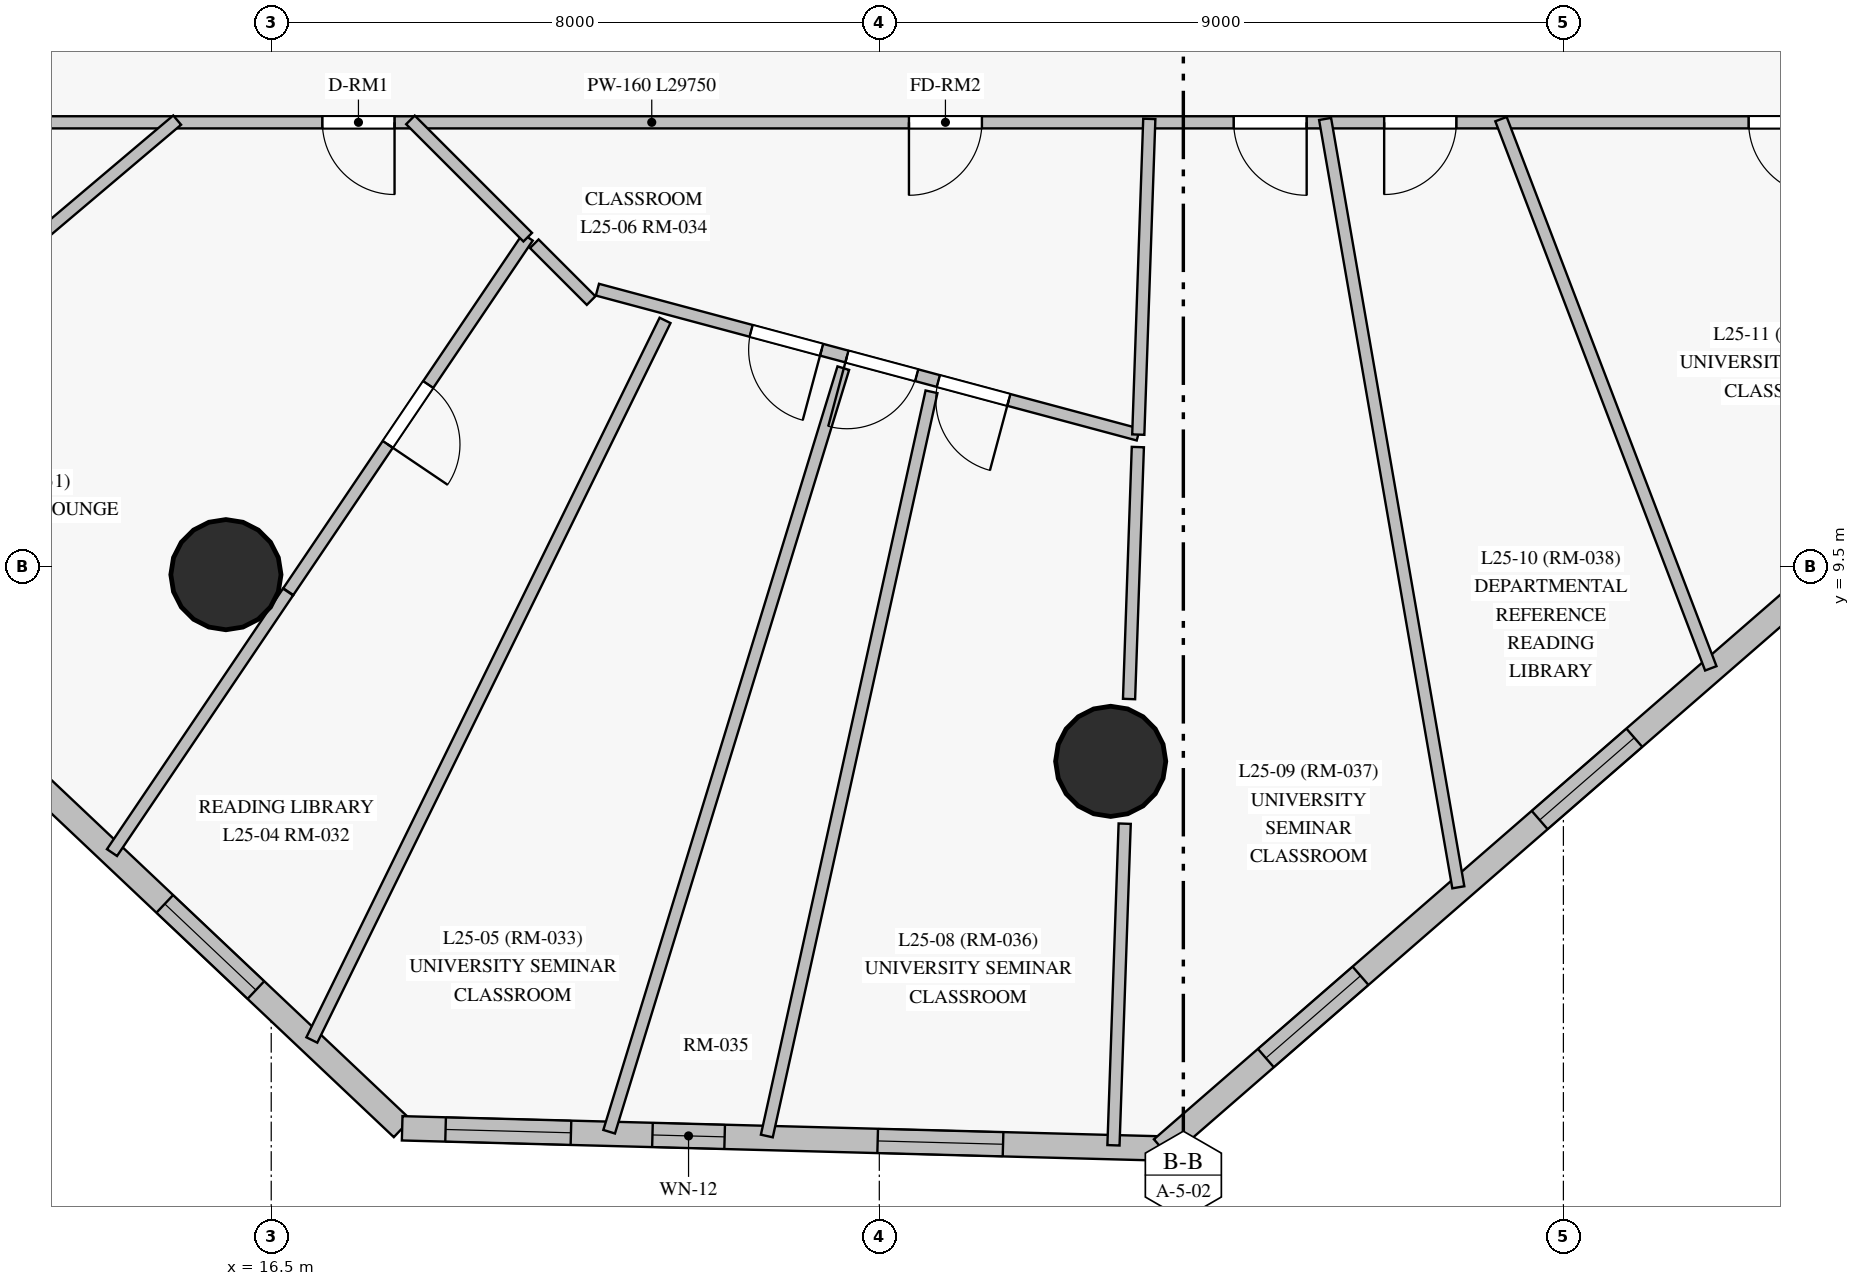
"""IFC4 building model, lengths in metres.
Left out: names, types, materials, properties, quantities, classifications, styles, units other than length and angle.
Written with IfcOpenShell. Run it as: python <this file> out.ifc"""

import sys

from ifc_helpers import new_model, si_unit, direction, frame, frame_2d, origin, origin_with_axes, origin_2d, place, context, subcontext, project, spatial, rectangle, circle, extrude, source, transform, mapped, element, fill, save


model = new_model("IFC4")
c1 = context("Model", 3, precision=1e-05, world=origin(), true_north=direction((0.0, 1.0)))
c2 = subcontext(c1, "Body", "Model", "MODEL_VIEW")
j1 = project(units=[si_unit("LENGTHUNIT", "METRE"), si_unit("PLANEANGLEUNIT", "RADIAN")], contexts=[c1])
p1 = place(None, origin())
s1 = spatial("IfcSite", under=j1, at=p1, CompositionType="ELEMENT")
p2 = place(p1, origin())
s2 = spatial("IfcBuilding", under=s1, at=p2, CompositionType="ELEMENT")
p3 = place(p2, frame((0.0, 0.0, 96.2)))
s3 = spatial("IfcBuildingStorey", under=s2, at=p3, CompositionType="ELEMENT", Elevation=96.2)
m1 = source(origin_with_axes(), c2, "Body", "SweptSolid", [
    extrude(circle(Radius=0.725, at=origin_2d()), origin(), (0.0, 0.0, 1.0), 3.05),
])
for number, where, z_axis, x_axis in (
    (1, (15.904, 9.399, 0.0), (0.0, 0.0, 1.0), (1.0, 0.0, 0.0)),
    (2, (27.544, 6.943, 0.0), (0.0, 0.0, 1.0), (1.0, 0.0, 0.0)),
):
    element("IfcColumn", number, at=place(p3, frame(where, z_axis=z_axis, x_axis=x_axis)), inside=s3, PredefinedType="COLUMN", context=c2, shape_type="MappedRepresentation", body=[
        mapped(m1, transform((0.0, 0.0, 0.0), scale=1.0)),
    ])
p4 = place(p3, frame((9.16, 10.682, 0.0), z_axis=(0.0, 0.0, 1.0), x_axis=(0.726725897384, -0.686927558096, 0.0)))
e3 = element("IfcWall", 3, at=p4, inside=s3, PredefinedType="SOLIDWALL", context=c2, shape_type="SweptSolid", body=[
    extrude(rectangle(XDim=12.471, YDim=0.32, at=frame_2d((6.236, 0.0))), origin(), (0.0, 0.0, 1.0), 2.825),
])
p5 = place(p4, frame((2.956, 0.0, 0.85)))
e4 = element("IfcOpeningElement", 4, at=p5, cuts=e3, PredefinedType="OPENING", context=c2, shape_type="SweptSolid", body=[
    extrude(rectangle(XDim=1.65, YDim=1.65, at=frame_2d((0.825, 0.825))), frame((0.0, 0.17, 0.0), z_axis=(0.0, -1.0, 0.0), x_axis=(1.0, 0.0, 0.0)), (0.0, 0.0, 1.0), 0.34),
])
p6 = place(p4, frame((8.173, 0.0, 0.85)))
e5 = element("IfcOpeningElement", 5, at=p6, cuts=e3, PredefinedType="OPENING", context=c2, shape_type="SweptSolid", body=[
    extrude(rectangle(XDim=1.65, YDim=1.65, at=frame_2d((0.825, 0.825))), frame((0.0, 0.17, 0.0), z_axis=(0.0, -1.0, 0.0), x_axis=(1.0, 0.0, 0.0)), (0.0, 0.0, 1.0), 0.34),
])
p7 = place(p3, frame((18.223, 2.115, 0.0), z_axis=(0.0, 0.0, 1.0), x_axis=(0.999648337499, -0.026517943636, 0.0)))
e6 = element("IfcWall", 6, at=p7, inside=s3, PredefinedType="SOLIDWALL", context=c2, shape_type="SweptSolid", body=[
    extrude(rectangle(XDim=9.998, YDim=0.32, at=frame_2d((4.999, 0.0))), origin(), (0.0, 0.0, 1.0), 2.825),
])
p8 = place(p7, frame((0.571, 0.0, 0.85)))
e7 = element("IfcOpeningElement", 7, at=p8, cuts=e6, PredefinedType="OPENING", context=c2, shape_type="SweptSolid", body=[
    extrude(rectangle(XDim=1.65, YDim=1.65, at=frame_2d((0.825, 0.825))), frame((0.0, 0.17, 0.0), z_axis=(0.0, -1.0, 0.0), x_axis=(1.0, 0.0, 0.0)), (0.0, 0.0, 1.0), 0.34),
])
p9 = place(p7, frame((3.294, 0.0, 0.85)))
e8 = element("IfcOpeningElement", 8, at=p9, cuts=e6, PredefinedType="OPENING", context=c2, shape_type="SweptSolid", body=[
    extrude(rectangle(XDim=0.95, YDim=1.5, at=frame_2d((0.475, 0.75))), frame((0.0, 0.17, 0.0), z_axis=(0.0, -1.0, 0.0), x_axis=(1.0, 0.0, 0.0)), (0.0, 0.0, 1.0), 0.34),
])
p10 = place(p7, frame((6.258, 0.0, 0.85)))
e9 = element("IfcOpeningElement", 9, at=p10, cuts=e6, PredefinedType="OPENING", context=c2, shape_type="SweptSolid", body=[
    extrude(rectangle(XDim=1.65, YDim=1.65, at=frame_2d((0.825, 0.825))), frame((0.0, 0.17, 0.0), z_axis=(0.0, -1.0, 0.0), x_axis=(1.0, 0.0, 0.0)), (0.0, 0.0, 1.0), 0.34),
])
p11 = place(p3, frame((28.218, 1.85, 0.0), z_axis=(0.0, 0.0, 1.0), x_axis=(0.754675133032, 0.65609865385, 0.0)))
e10 = element("IfcWall", 10, at=p11, inside=s3, PredefinedType="SOLIDWALL", context=c2, shape_type="SweptSolid", body=[
    extrude(rectangle(XDim=14.949, YDim=0.32, at=frame_2d((7.475, 0.0))), origin(), (0.0, 0.0, 1.0), 2.825),
])
p12 = place(p11, frame((1.813, 0.0, 0.85)))
e11 = element("IfcOpeningElement", 11, at=p12, cuts=e10, PredefinedType="OPENING", context=c2, shape_type="SweptSolid", body=[
    extrude(rectangle(XDim=1.65, YDim=1.65, at=frame_2d((0.825, 0.825))), frame((0.0, 0.17, 0.0), z_axis=(0.0, -1.0, 0.0), x_axis=(1.0, 0.0, 0.0)), (0.0, 0.0, 1.0), 0.34),
])
p13 = place(p11, frame((6.586, 0.0, 0.85)))
e12 = element("IfcOpeningElement", 12, at=p13, cuts=e10, PredefinedType="OPENING", context=c2, shape_type="SweptSolid", body=[
    extrude(rectangle(XDim=1.65, YDim=1.65, at=frame_2d((0.825, 0.825))), frame((0.0, 0.17, 0.0), z_axis=(0.0, -1.0, 0.0), x_axis=(1.0, 0.0, 0.0)), (0.0, 0.0, 1.0), 0.34),
])
p14 = place(p11, frame((11.423, 0.0, 0.85)))
e13 = element("IfcOpeningElement", 13, at=p14, cuts=e10, PredefinedType="OPENING", context=c2, shape_type="SweptSolid", body=[
    extrude(rectangle(XDim=1.65, YDim=1.65, at=frame_2d((0.825, 0.825))), frame((0.0, 0.17, 0.0), z_axis=(0.0, -1.0, 0.0), x_axis=(1.0, 0.0, 0.0)), (0.0, 0.0, 1.0), 0.34),
])
p15 = place(p3, frame((40.25, 15.35, 0.0), z_axis=(0.0, 0.0, 1.0), x_axis=(-1.0, 0.0, 0.0)))
e14 = element("IfcWall", 14, at=p15, inside=s3, PredefinedType="PARTITIONING", context=c2, shape_type="SweptSolid", body=[
    extrude(rectangle(XDim=29.75, YDim=0.16, at=frame_2d((14.875, 0.0))), origin(), (0.0, 0.0, 1.0), 2.225),
])
p16 = place(p15, frame((22.127, 0.0, 0.0)))
e15 = element("IfcOpeningElement", 15, at=p16, cuts=e14, PredefinedType="OPENING", context=c2, shape_type="SweptSolid", body=[
    extrude(rectangle(XDim=0.95, YDim=2.15, at=frame_2d((0.475, 1.075))), frame((0.0, 0.09, 0.0), z_axis=(0.0, -1.0, 0.0), x_axis=(1.0, 0.0, 0.0)), (0.0, 0.0, 1.0), 0.18),
])
p17 = place(p15, frame((14.4, 0.0, 0.0)))
e16 = element("IfcOpeningElement", 16, at=p17, cuts=e14, PredefinedType="OPENING", context=c2, shape_type="SweptSolid", body=[
    extrude(rectangle(XDim=0.96, YDim=2.15, at=frame_2d((0.48, 1.075))), frame((0.0, 0.09, 0.0), z_axis=(0.0, -1.0, 0.0), x_axis=(1.0, 0.0, 0.0)), (0.0, 0.0, 1.0), 0.18),
])
p18 = place(p15, frame((10.127, 0.0, 0.0)))
e17 = element("IfcOpeningElement", 17, at=p18, cuts=e14, PredefinedType="OPENING", context=c2, shape_type="SweptSolid", body=[
    extrude(rectangle(XDim=0.96, YDim=2.15, at=frame_2d((0.48, 1.075))), frame((0.0, 0.09, 0.0), z_axis=(0.0, -1.0, 0.0), x_axis=(1.0, 0.0, 0.0)), (0.0, 0.0, 1.0), 0.18),
])
p19 = place(p15, frame((8.158, 0.0, 0.0)))
e18 = element("IfcOpeningElement", 18, at=p19, cuts=e14, PredefinedType="OPENING", context=c2, shape_type="SweptSolid", body=[
    extrude(rectangle(XDim=0.95, YDim=2.15, at=frame_2d((0.475, 1.075))), frame((0.0, 0.09, 0.0), z_axis=(0.0, -1.0, 0.0), x_axis=(1.0, 0.0, 0.0)), (0.0, 0.0, 1.0), 0.18),
])
p20 = place(p15, frame((3.353, 0.0, 0.0)))
e19 = element("IfcOpeningElement", 19, at=p20, cuts=e14, PredefinedType="OPENING", context=c2, shape_type="SweptSolid", body=[
    extrude(rectangle(XDim=0.96, YDim=2.15, at=frame_2d((0.48, 1.075))), frame((0.0, 0.09, 0.0), z_axis=(0.0, -1.0, 0.0), x_axis=(1.0, 0.0, 0.0)), (0.0, 0.0, 1.0), 0.18),
])
p21 = place(p3, frame((21.681, 12.744, 0.0), z_axis=(0.0, 0.0, 1.0), x_axis=(-0.440627063777, -0.897690253187, 0.0)))
e20 = element("IfcWall", 20, at=p21, inside=s3, PredefinedType="PARTITIONING", context=c2, shape_type="SweptSolid", body=[
    extrude(rectangle(XDim=10.546, YDim=0.16, at=frame_2d((5.273, 0.0))), origin(), (0.0, 0.0, 1.0), 2.825),
])
p22 = place(p3, frame((24.026, 12.116, 0.0), z_axis=(0.0, 0.0, 1.0), x_axis=(-0.293181178855, -0.956056900171, 0.0)))
e21 = element("IfcWall", 21, at=p22, inside=s3, PredefinedType="PARTITIONING", context=c2, shape_type="SweptSolid", body=[
    extrude(rectangle(XDim=10.507, YDim=0.16, at=frame_2d((5.254, 0.0))), origin(), (0.0, 0.0, 1.0), 2.825),
])
p23 = place(p3, frame((30.365, 15.394, 0.0), z_axis=(0.0, 0.0, 1.0), x_axis=(0.170863116861, -0.985294775839, 0.0)))
e22 = element("IfcWall", 22, at=p23, inside=s3, PredefinedType="PARTITIONING", context=c2, shape_type="SweptSolid", body=[
    extrude(rectangle(XDim=10.259, YDim=0.16, at=frame_2d((5.13, 0.0))), origin(), (0.0, 0.0, 1.0), 2.825),
])
p24 = place(p3, frame((25.187, 11.805, 0.0), z_axis=(0.0, 0.0, 1.0), x_axis=(-0.216053884033, -0.976381441443, 0.0)))
e23 = element("IfcWall", 23, at=p24, inside=s3, PredefinedType="PARTITIONING", context=c2, shape_type="SweptSolid", body=[
    extrude(rectangle(XDim=10.028, YDim=0.16, at=frame_2d((5.014, 0.0))), origin(), (0.0, 0.0, 1.0), 2.825),
])
p25 = place(p3, frame((32.679, 15.392, 0.0), z_axis=(0.0, 0.0, 1.0), x_axis=(0.356831287963, -0.934168845515, 0.0)))
e24 = element("IfcWall", 24, at=p25, inside=s3, PredefinedType="PARTITIONING", context=c2, shape_type="SweptSolid", body=[
    extrude(rectangle(XDim=7.735, YDim=0.16, at=frame_2d((3.867, 0.0))), origin(), (0.0, 0.0, 1.0), 2.825),
])
p26 = place(p3, frame((15.262, 15.379, 0.0), z_axis=(0.0, 0.0, 1.0), x_axis=(-0.763411780434, -0.645912109729, 0.0)))
e25 = element("IfcWall", 25, at=p26, inside=s3, PredefinedType="PARTITIONING", context=c2, shape_type="SweptSolid", body=[
    extrude(rectangle(XDim=7.628, YDim=0.16, at=frame_2d((3.814, 0.0))), origin(), (0.0, 0.0, 1.0), 2.225),
])
p27 = place(p3, frame((27.907, 11.242, 0.0), z_axis=(0.0, 0.0, 1.0), x_axis=(-0.965920682586, 0.258838240899, 0.0)))
e26 = element("IfcWall", 26, at=p27, inside=s3, PredefinedType="PARTITIONING", context=c2, shape_type="SweptSolid", body=[
    extrude(rectangle(XDim=7.366, YDim=0.16, at=frame_2d((3.683, 0.0))), origin(), (0.0, 0.0, 1.0), 2.325),
])
p28 = place(p27, frame((4.313, 0.0, 0.0)))
e27 = element("IfcOpeningElement", 27, at=p28, cuts=e26, PredefinedType="OPENING", context=c2, shape_type="SweptSolid", body=[
    extrude(rectangle(XDim=0.96, YDim=2.15, at=frame_2d((0.48, 1.075))), frame((0.0, 0.09, 0.0), z_axis=(0.0, -1.0, 0.0), x_axis=(1.0, 0.0, 0.0)), (0.0, 0.0, 1.0), 0.18),
])
p29 = place(p27, frame((3.018, 0.0, 0.0)))
e28 = element("IfcOpeningElement", 28, at=p29, cuts=e26, PredefinedType="OPENING", context=c2, shape_type="SweptSolid", body=[
    extrude(rectangle(XDim=0.95, YDim=2.15, at=frame_2d((0.475, 1.075))), frame((0.0, 0.09, 0.0), z_axis=(0.0, -1.0, 0.0), x_axis=(1.0, 0.0, 0.0)), (0.0, 0.0, 1.0), 0.18),
])
p30 = place(p27, frame((1.763, 0.0, 0.0)))
e29 = element("IfcOpeningElement", 29, at=p30, cuts=e26, PredefinedType="OPENING", context=c2, shape_type="SweptSolid", body=[
    extrude(rectangle(XDim=0.96, YDim=2.15, at=frame_2d((0.48, 1.075))), frame((0.0, 0.09, 0.0), z_axis=(0.0, -1.0, 0.0), x_axis=(1.0, 0.0, 0.0)), (0.0, 0.0, 1.0), 0.18),
])
p31 = place(p3, frame((19.875, 13.839, 0.0), z_axis=(0.0, 0.0, 1.0), x_axis=(-0.559775304188, -0.82864444053, 0.0)))
e30 = element("IfcWall", 30, at=p31, inside=s3, PredefinedType="PARTITIONING", context=c2, shape_type="SweptSolid", body=[
    extrude(rectangle(XDim=5.628, YDim=0.16, at=frame_2d((2.814, 0.0))), origin(), (0.0, 0.0, 1.0), 2.825),
])
p32 = place(p31, frame((2.339, 0.0, 0.0)))
e31 = element("IfcOpeningElement", 31, at=p32, cuts=e30, PredefinedType="OPENING", context=c2, shape_type="SweptSolid", body=[
    extrude(rectangle(XDim=0.95, YDim=2.15, at=frame_2d((0.475, 1.075))), frame((0.0, 0.09, 0.0), z_axis=(0.0, -1.0, 0.0), x_axis=(1.0, 0.0, 0.0)), (0.0, 0.0, 1.0), 0.18),
])
p33 = place(p3, frame((27.728, 6.123, 0.0), z_axis=(0.0, 0.0, 1.0), x_axis=(-0.03488729491, -0.99939125304, 0.0)))
e32 = element("IfcWall", 32, at=p33, inside=s3, PredefinedType="PARTITIONING", context=c2, shape_type="SweptSolid", body=[
    extrude(rectangle(XDim=4.234, YDim=0.16, at=frame_2d((2.117, 0.0))), origin(), (0.0, 0.0, 1.0), 2.825),
])
p34 = place(p3, frame((28.052, 15.395, 0.0), z_axis=(0.0, 0.0, 1.0), x_axis=(-0.034895264462, -0.999390974803, 0.0)))
e33 = element("IfcWall", 33, at=p34, inside=s3, PredefinedType="PARTITIONING", context=c2, shape_type="SweptSolid", body=[
    extrude(rectangle(XDim=4.156, YDim=0.16, at=frame_2d((2.078, 0.0))), origin(), (0.0, 0.0, 1.0), 2.825),
])
p35 = place(p3, frame((16.721, 9.171, 0.0), z_axis=(0.0, 0.0, 1.0), x_axis=(-0.559768724879, -0.828648885022, 0.0)))
e34 = element("IfcWall", 34, at=p35, inside=s3, PredefinedType="PARTITIONING", context=c2, shape_type="SweptSolid", body=[
    extrude(rectangle(XDim=4.138, YDim=0.16, at=frame_2d((2.069, 0.0))), origin(), (0.0, 0.0, 1.0), 2.825),
])
p36 = place(p3, frame((27.901, 11.078, 0.0), z_axis=(0.0, 0.0, 1.0), x_axis=(-0.034890726755, -0.999391133234, 0.0)))
e35 = element("IfcWall", 35, at=p36, inside=s3, PredefinedType="PARTITIONING", context=c2, shape_type="SweptSolid", body=[
    extrude(rectangle(XDim=3.317, YDim=0.16, at=frame_2d((1.658, 0.0))), origin(), (0.0, 0.0, 1.0), 2.225),
])
p37 = place(p3, frame((18.332, 15.382, 0.0), z_axis=(0.0, 0.0, 1.0), x_axis=(0.707050832555, -0.707162725391, 0.0)))
e36 = element("IfcWall", 36, at=p37, inside=s3, PredefinedType="PARTITIONING", context=c2, shape_type="SweptSolid", body=[
    extrude(rectangle(XDim=2.182, YDim=0.16, at=frame_2d((1.091, 0.0))), origin(), (0.0, 0.0, 1.0), 2.325),
])
p38 = place(p3, frame((19.961, 13.752, 0.0), z_axis=(0.0, 0.0, 1.0), x_axis=(0.707106781187, -0.707106781187, 0.0)))
e37 = element("IfcWall", 37, at=p38, inside=s3, PredefinedType="PARTITIONING", context=c2, shape_type="SweptSolid", body=[
    extrude(rectangle(XDim=1.057, YDim=0.16, at=frame_2d((0.529, 0.0))), origin(), (0.0, 0.0, 1.0), 2.325),
])
m2 = source(origin_with_axes(), c2, "Body", "SweptSolid", [
    extrude(rectangle(XDim=1.65, YDim=1.65, at=frame_2d((0.825, 0.825))), frame((0.0, 0.03, 0.0), z_axis=(0.0, -1.0, 0.0), x_axis=(1.0, 0.0, 0.0)), (0.0, 0.0, 1.0), 0.06),
])
p39 = place(p6, origin())
e38 = element("IfcWindow", 38, at=p39, inside=s3, PartitioningType="SINGLE_PANEL", PredefinedType="WINDOW", context=c2, shape_type="MappedRepresentation", body=[
    mapped(m2, transform((0.0, 0.0, 0.0), scale=1.0)),
])
fill(e5, e38)
p40 = place(p8, origin())
e39 = element("IfcWindow", 39, at=p40, inside=s3, PartitioningType="SINGLE_PANEL", PredefinedType="WINDOW", context=c2, shape_type="MappedRepresentation", body=[
    mapped(m2, transform((0.0, 0.0, 0.0), scale=1.0)),
])
fill(e7, e39)
m3 = source(origin_with_axes(), c2, "Body", "SweptSolid", [
    extrude(rectangle(XDim=0.95, YDim=1.5, at=frame_2d((0.475, 0.75))), frame((0.0, 0.03, 0.0), z_axis=(0.0, -1.0, 0.0), x_axis=(1.0, 0.0, 0.0)), (0.0, 0.0, 1.0), 0.06),
])
p41 = place(p9, origin())
e40 = element("IfcWindow", 40, at=p41, inside=s3, PartitioningType="SINGLE_PANEL", PredefinedType="WINDOW", context=c2, shape_type="MappedRepresentation", body=[
    mapped(m3, transform((0.0, 0.0, 0.0), scale=1.0)),
])
fill(e8, e40)
p42 = place(p10, origin())
e41 = element("IfcWindow", 41, at=p42, inside=s3, PartitioningType="SINGLE_PANEL", PredefinedType="WINDOW", context=c2, shape_type="MappedRepresentation", body=[
    mapped(m2, transform((0.0, 0.0, 0.0), scale=1.0)),
])
fill(e9, e41)
p43 = place(p12, origin())
e42 = element("IfcWindow", 42, at=p43, inside=s3, PartitioningType="SINGLE_PANEL", PredefinedType="WINDOW", context=c2, shape_type="MappedRepresentation", body=[
    mapped(m2, transform((0.0, 0.0, 0.0), scale=1.0)),
])
fill(e11, e42)
p44 = place(p13, origin())
e43 = element("IfcWindow", 43, at=p44, inside=s3, PartitioningType="SINGLE_PANEL", PredefinedType="WINDOW", context=c2, shape_type="MappedRepresentation", body=[
    mapped(m2, transform((0.0, 0.0, 0.0), scale=1.0)),
])
fill(e12, e43)
m4 = source(origin_with_axes(), c2, "Body", "SweptSolid", [
    extrude(rectangle(XDim=0.95, YDim=2.15, at=frame_2d((0.475, 1.075))), frame((0.0, 0.025, 0.0), z_axis=(0.0, -1.0, 0.0), x_axis=(1.0, 0.0, 0.0)), (0.0, 0.0, 1.0), 0.05),
])
p45 = place(p16, origin())
e44 = element("IfcDoor", 44, at=p45, inside=s3, OperationType="SINGLE_SWING_LEFT", PredefinedType="DOOR", context=c2, shape_type="MappedRepresentation", body=[
    mapped(m4, transform((0.0, 0.0, 0.0), scale=1.0)),
])
fill(e15, e44)
m5 = source(origin_with_axes(), c2, "Body", "SweptSolid", [
    extrude(rectangle(XDim=0.96, YDim=2.15, at=frame_2d((0.48, 1.075))), frame((0.0, 0.025, 0.0), z_axis=(0.0, -1.0, 0.0), x_axis=(1.0, 0.0, 0.0)), (0.0, 0.0, 1.0), 0.05),
])
p46 = place(p17, origin())
e45 = element("IfcDoor", 45, at=p46, inside=s3, OperationType="SINGLE_SWING_RIGHT", PredefinedType="DOOR", context=c2, shape_type="MappedRepresentation", body=[
    mapped(m5, transform((0.0, 0.0, 0.0), scale=1.0)),
])
fill(e16, e45)
p47 = place(p18, origin())
e46 = element("IfcDoor", 46, at=p47, inside=s3, OperationType="SINGLE_SWING_LEFT", PredefinedType="DOOR", context=c2, shape_type="MappedRepresentation", body=[
    mapped(m5, transform((0.0, 0.0, 0.0), scale=1.0)),
])
fill(e17, e46)
p48 = place(p19, origin())
e47 = element("IfcDoor", 47, at=p48, inside=s3, OperationType="SINGLE_SWING_RIGHT", PredefinedType="DOOR", context=c2, shape_type="MappedRepresentation", body=[
    mapped(m4, transform((0.0, 0.0, 0.0), scale=1.0)),
])
fill(e18, e47)
p49 = place(p20, origin())
e48 = element("IfcDoor", 48, at=p49, inside=s3, OperationType="SINGLE_SWING_LEFT", PredefinedType="DOOR", context=c2, shape_type="MappedRepresentation", body=[
    mapped(m5, transform((0.0, 0.0, 0.0), scale=1.0)),
])
fill(e19, e48)
p50 = place(p32, origin())
e49 = element("IfcDoor", 49, at=p50, inside=s3, OperationType="SINGLE_SWING_RIGHT", PredefinedType="DOOR", context=c2, shape_type="MappedRepresentation", body=[
    mapped(m4, transform((0.0, 0.0, 0.0), scale=1.0)),
])
fill(e31, e49)
p51 = place(p28, origin())
e50 = element("IfcDoor", 50, at=p51, inside=s3, OperationType="SINGLE_SWING_LEFT", PredefinedType="DOOR", context=c2, shape_type="MappedRepresentation", body=[
    mapped(m5, transform((0.0, 0.0, 0.0), scale=1.0)),
])
fill(e27, e50)
p52 = place(p29, origin())
e51 = element("IfcDoor", 51, at=p52, inside=s3, OperationType="SINGLE_SWING_RIGHT", PredefinedType="DOOR", context=c2, shape_type="MappedRepresentation", body=[
    mapped(m4, transform((0.0, 0.0, 0.0), scale=1.0)),
])
fill(e28, e51)
p53 = place(p30, origin())
e52 = element("IfcDoor", 52, at=p53, inside=s3, OperationType="SINGLE_SWING_LEFT", PredefinedType="DOOR", context=c2, shape_type="MappedRepresentation", body=[
    mapped(m5, transform((0.0, 0.0, 0.0), scale=1.0)),
])
fill(e29, e52)
save(model, sys.argv[1])
